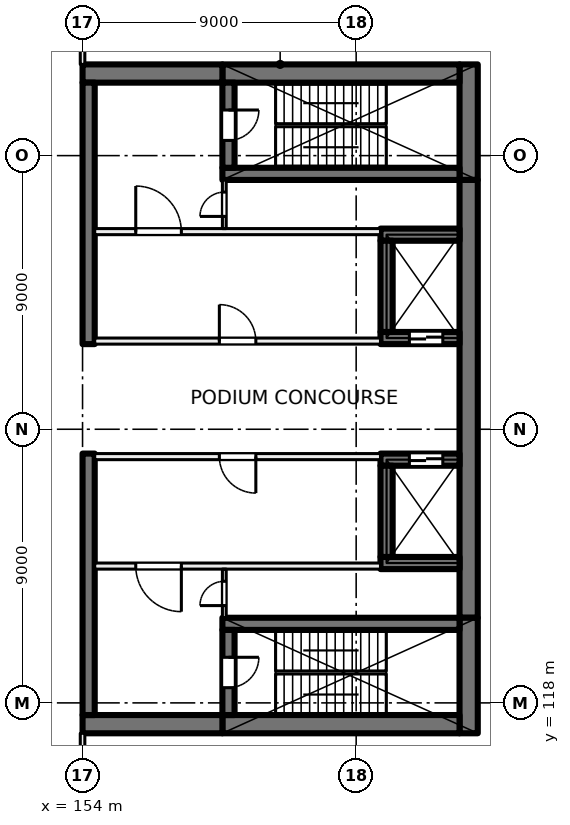
"""IFC4 building model, lengths in metres.
Left out: names, types, materials, properties, quantities, classifications, styles, units other than length and angle.
Written with IfcOpenShell. Run it as: python <this file> out.ifc"""

import sys

from ifc_helpers import new_model, si_unit, direction, frame, frame_2d, origin, place, context, subcontext, project, spatial, rectangle, extrude, element, fill, save


model = new_model("IFC4")
c1 = context("Model", 3, precision=1e-05, world=origin(), true_north=direction((0.0, 1.0)))
c2 = subcontext(c1, "Body", "Model", "MODEL_VIEW")
j1 = project(units=[si_unit("LENGTHUNIT", "METRE"), si_unit("PLANEANGLEUNIT", "RADIAN")], contexts=[c1])
p1 = place(None, origin())
s1 = spatial("IfcSite", under=j1, at=p1, CompositionType="ELEMENT")
p2 = place(p1, origin())
s2 = spatial("IfcBuilding", under=s1, at=p2, CompositionType="ELEMENT")
p3 = place(p2, frame((0.0, 0.0, 22.5)))
s3 = spatial("IfcBuildingStorey", under=s2, at=p3, CompositionType="ELEMENT", Elevation=22.5)
p4 = place(p3, frame((166.7, 139.0, 0.0), z_axis=(0.0, 0.0, 1.0), x_axis=(0.0, -1.0, 0.0)))
e1 = element("IfcWall", 1, at=p4, inside=s3, PredefinedType="SHEAR", context=c2, shape_type="SweptSolid", body=[
    extrude(rectangle(XDim=3.8, YDim=0.6, at=frame_2d((1.9, 0.0))), origin(), (0.0, 0.0, 1.0), 5.0),
])
p5 = place(p3, frame((166.7, 135.2, 0.0), z_axis=(0.0, 0.0, 1.0), x_axis=(0.0, -1.0, 0.0)))
e2 = element("IfcWall", 2, at=p5, inside=s3, PredefinedType="SHEAR", context=c2, shape_type="SweptSolid", body=[
    extrude(rectangle(XDim=14.4, YDim=0.6, at=frame_2d((7.2, 0.0))), origin(), (0.0, 0.0, 1.0), 5.0),
])
p6 = place(p3, frame((166.7, 120.8, 0.0), z_axis=(0.0, 0.0, 1.0), x_axis=(0.0, -1.0, 0.0)))
e3 = element("IfcWall", 3, at=p6, inside=s3, PredefinedType="SHEAR", context=c2, shape_type="SweptSolid", body=[
    extrude(rectangle(XDim=3.8, YDim=0.6, at=frame_2d((1.9, 0.0))), origin(), (0.0, 0.0, 1.0), 5.0),
])
for number, where, z_axis, x_axis in (
    (4, (166.4, 138.7, 0.0), (0.0, 0.0, 1.0), (-1.0, 0.0, 0.0)),
    (5, (166.4, 117.3, 0.0), (0.0, 0.0, 1.0), (-1.0, 0.0, 0.0)),
):
    element("IfcWall", number, at=place(p3, frame(where, z_axis=z_axis, x_axis=x_axis)), inside=s3, PredefinedType="SHEAR", context=c2, shape_type="SweptSolid", body=[
        extrude(rectangle(XDim=7.8, YDim=0.6, at=frame_2d((3.9, 0.0))), origin(), (0.0, 0.0, 1.0), 5.0),
    ])
for number, where, z_axis, x_axis in (
    (6, (158.6, 138.7, 0.0), (0.0, 0.0, 1.0), (-1.0, 0.0, 0.0)),
    (7, (158.6, 117.3, 0.0), (0.0, 0.0, 1.0), (-1.0, 0.0, 0.0)),
):
    element("IfcWall", number, at=place(p3, frame(where, z_axis=z_axis, x_axis=x_axis)), inside=s3, PredefinedType="SHEAR", context=c2, shape_type="SweptSolid", body=[
        extrude(rectangle(XDim=4.6, YDim=0.6, at=frame_2d((2.3, 0.0))), origin(), (0.0, 0.0, 1.0), 5.0),
    ])
p7 = place(p3, frame((166.4, 135.4, 0.0), z_axis=(0.0, 0.0, 1.0), x_axis=(-1.0, 0.0, 0.0)))
e8 = element("IfcWall", 8, at=p7, inside=s3, PredefinedType="SHEAR", context=c2, shape_type="SweptSolid", body=[
    extrude(rectangle(XDim=7.8, YDim=0.4, at=frame_2d((3.9, 0.0))), origin(), (0.0, 0.0, 1.0), 5.0),
])
p8 = place(p3, frame((158.8, 138.4, 0.0), z_axis=(0.0, 0.0, 1.0), x_axis=(0.0, -1.0, 0.0)))
e9 = element("IfcWall", 9, at=p8, inside=s3, PredefinedType="SHEAR", context=c2, shape_type="SweptSolid", body=[
    extrude(rectangle(XDim=2.8, YDim=0.4, at=frame_2d((1.4, 0.0))), origin(), (0.0, 0.0, 1.0), 5.0),
])
p9 = place(p8, frame((0.9, 0.0, 0.0)))
e10 = element("IfcOpeningElement", 10, at=p9, cuts=e9, PredefinedType="OPENING", context=c2, shape_type="SweptSolid", body=[
    extrude(rectangle(XDim=1.0, YDim=2.1, at=frame_2d((0.5, 1.05))), frame((0.0, 0.21, 0.0), z_axis=(0.0, -1.0, 0.0), x_axis=(1.0, 0.0, 0.0)), (0.0, 0.0, 1.0), 0.42),
])
p10 = place(p3, frame((166.4, 120.6, 0.0), z_axis=(0.0, 0.0, 1.0), x_axis=(-1.0, 0.0, 0.0)))
e11 = element("IfcWall", 11, at=p10, inside=s3, PredefinedType="SHEAR", context=c2, shape_type="SweptSolid", body=[
    extrude(rectangle(XDim=7.8, YDim=0.4, at=frame_2d((3.9, 0.0))), origin(), (0.0, 0.0, 1.0), 5.0),
])
p11 = place(p3, frame((158.8, 120.4, 0.0), z_axis=(0.0, 0.0, 1.0), x_axis=(0.0, -1.0, 0.0)))
e12 = element("IfcWall", 12, at=p11, inside=s3, PredefinedType="SHEAR", context=c2, shape_type="SweptSolid", body=[
    extrude(rectangle(XDim=2.8, YDim=0.4, at=frame_2d((1.4, 0.0))), origin(), (0.0, 0.0, 1.0), 5.0),
])
p12 = place(p11, frame((0.9, 0.0, 0.0)))
e13 = element("IfcOpeningElement", 13, at=p12, cuts=e12, PredefinedType="OPENING", context=c2, shape_type="SweptSolid", body=[
    extrude(rectangle(XDim=1.0, YDim=2.1, at=frame_2d((0.5, 1.05))), frame((0.0, 0.21, 0.0), z_axis=(0.0, -1.0, 0.0), x_axis=(1.0, 0.0, 0.0)), (0.0, 0.0, 1.0), 0.42),
])
p13 = place(p3, frame((166.4, 130.0, 0.0), z_axis=(0.0, 0.0, 1.0), x_axis=(-1.0, 0.0, 0.0)))
e14 = element("IfcWall", 14, at=p13, inside=s3, PredefinedType="SHEAR", context=c2, shape_type="SweptSolid", body=[
    extrude(rectangle(XDim=2.6, YDim=0.4, at=frame_2d((1.3, 0.0))), origin(), (0.0, 0.0, 1.0), 5.0),
])
p14 = place(p13, frame((0.55, 0.0, 0.0)))
e15 = element("IfcOpeningElement", 15, at=p14, cuts=e14, PredefinedType="OPENING", context=c2, shape_type="SweptSolid", body=[
    extrude(rectangle(XDim=1.1, YDim=2.1, at=frame_2d((0.55, 1.05))), frame((0.0, 0.21, 0.0), z_axis=(0.0, -1.0, 0.0), x_axis=(1.0, 0.0, 0.0)), (0.0, 0.0, 1.0), 0.42),
])
p15 = place(p3, frame((166.4, 133.4, 0.0), z_axis=(0.0, 0.0, 1.0), x_axis=(-1.0, 0.0, 0.0)))
e16 = element("IfcWall", 16, at=p15, inside=s3, PredefinedType="SHEAR", context=c2, shape_type="SweptSolid", body=[
    extrude(rectangle(XDim=2.6, YDim=0.4, at=frame_2d((1.3, 0.0))), origin(), (0.0, 0.0, 1.0), 5.0),
])
p16 = place(p3, frame((164.0, 133.2, 0.0), z_axis=(0.0, 0.0, 1.0), x_axis=(0.0, -1.0, 0.0)))
e17 = element("IfcWall", 17, at=p16, inside=s3, PredefinedType="SHEAR", context=c2, shape_type="SweptSolid", body=[
    extrude(rectangle(XDim=3.0, YDim=0.4, at=frame_2d((1.5, 0.0))), origin(), (0.0, 0.0, 1.0), 5.0),
])
p17 = place(p3, frame((166.4, 126.0, 0.0), z_axis=(0.0, 0.0, 1.0), x_axis=(-1.0, 0.0, 0.0)))
e18 = element("IfcWall", 18, at=p17, inside=s3, PredefinedType="SHEAR", context=c2, shape_type="SweptSolid", body=[
    extrude(rectangle(XDim=2.6, YDim=0.4, at=frame_2d((1.3, 0.0))), origin(), (0.0, 0.0, 1.0), 5.0),
])
p18 = place(p17, frame((0.55, 0.0, 0.0)))
e19 = element("IfcOpeningElement", 19, at=p18, cuts=e18, PredefinedType="OPENING", context=c2, shape_type="SweptSolid", body=[
    extrude(rectangle(XDim=1.1, YDim=2.1, at=frame_2d((0.55, 1.05))), frame((0.0, 0.21, 0.0), z_axis=(0.0, -1.0, 0.0), x_axis=(1.0, 0.0, 0.0)), (0.0, 0.0, 1.0), 0.42),
])
p19 = place(p3, frame((166.4, 122.6, 0.0), z_axis=(0.0, 0.0, 1.0), x_axis=(-1.0, 0.0, 0.0)))
e20 = element("IfcWall", 20, at=p19, inside=s3, PredefinedType="SHEAR", context=c2, shape_type="SweptSolid", body=[
    extrude(rectangle(XDim=2.6, YDim=0.4, at=frame_2d((1.3, 0.0))), origin(), (0.0, 0.0, 1.0), 5.0),
])
p20 = place(p3, frame((164.0, 125.8, 0.0), z_axis=(0.0, 0.0, 1.0), x_axis=(0.0, -1.0, 0.0)))
e21 = element("IfcWall", 21, at=p20, inside=s3, PredefinedType="SHEAR", context=c2, shape_type="SweptSolid", body=[
    extrude(rectangle(XDim=3.0, YDim=0.4, at=frame_2d((1.5, 0.0))), origin(), (0.0, 0.0, 1.0), 5.0),
])
for number, where, z_axis, x_axis in (
    (22, (154.2, 138.4, 0.0), (0.0, 0.0, 1.0), (0.0, -1.0, 0.0)),
    (23, (154.2, 126.2, 0.0), (0.0, 0.0, 1.0), (0.0, -1.0, 0.0)),
):
    element("IfcWall", number, at=place(p3, frame(where, z_axis=z_axis, x_axis=x_axis)), inside=s3, PredefinedType="SHEAR", context=c2, shape_type="SweptSolid", body=[
        extrude(rectangle(XDim=8.6, YDim=0.4, at=frame_2d((4.3, 0.0))), origin(), (0.0, 0.0, 1.0), 5.0),
    ])
p21 = place(p3, frame((163.8, 126.1, 0.0), z_axis=(0.0, 0.0, 1.0), x_axis=(-1.0, 0.0, 0.0)))
e24 = element("IfcWall", 24, at=p21, inside=s3, PredefinedType="PARTITIONING", context=c2, shape_type="SweptSolid", body=[
    extrude(rectangle(XDim=9.4, YDim=0.2, at=frame_2d((4.7, 0.0))), origin(), (0.0, 0.0, 1.0), 4.625),
])
p22 = place(p21, frame((4.1, 0.0, 0.0)))
e25 = element("IfcOpeningElement", 25, at=p22, cuts=e24, PredefinedType="OPENING", context=c2, shape_type="SweptSolid", body=[
    extrude(rectangle(XDim=1.2, YDim=2.1, at=frame_2d((0.6, 1.05))), frame((0.0, 0.11, 0.0), z_axis=(0.0, -1.0, 0.0), x_axis=(1.0, 0.0, 0.0)), (0.0, 0.0, 1.0), 0.22),
])
p23 = place(p3, frame((163.8, 122.5, 0.0), z_axis=(0.0, 0.0, 1.0), x_axis=(-1.0, 0.0, 0.0)))
e26 = element("IfcWall", 26, at=p23, inside=s3, PredefinedType="PARTITIONING", context=c2, shape_type="SweptSolid", body=[
    extrude(rectangle(XDim=9.4, YDim=0.2, at=frame_2d((4.7, 0.0))), origin(), (0.0, 0.0, 1.0), 4.625),
])
p24 = place(p23, frame((6.55, 0.0, 0.0)))
e27 = element("IfcOpeningElement", 27, at=p24, cuts=e26, PredefinedType="OPENING", context=c2, shape_type="SweptSolid", body=[
    extrude(rectangle(XDim=1.5, YDim=2.1, at=frame_2d((0.75, 1.05))), frame((0.0, 0.11, 0.0), z_axis=(0.0, -1.0, 0.0), x_axis=(1.0, 0.0, 0.0)), (0.0, 0.0, 1.0), 0.22),
])
p25 = place(p3, frame((158.663, 120.8, 0.0), z_axis=(0.0, 0.0, 1.0), x_axis=(0.0, 1.0, 0.0)))
e28 = element("IfcWall", 28, at=p25, inside=s3, PredefinedType="PARTITIONING", context=c2, shape_type="SweptSolid", body=[
    extrude(rectangle(XDim=1.6, YDim=0.125, at=frame_2d((0.8, 0.0))), origin(), (0.0, 0.0, 1.0), 4.625),
])
p26 = place(p25, frame((0.4, 0.0, 0.0)))
e29 = element("IfcOpeningElement", 29, at=p26, cuts=e28, PredefinedType="OPENING", context=c2, shape_type="SweptSolid", body=[
    extrude(rectangle(XDim=0.8, YDim=2.1, at=frame_2d((0.4, 1.05))), frame((0.0, 0.073, 0.0), z_axis=(0.0, -1.0, 0.0), x_axis=(1.0, 0.0, 0.0)), (0.0, 0.0, 1.0), 0.145),
])
p27 = place(p3, frame((154.4, 129.9, 0.0), z_axis=(0.0, 0.0, 1.0), x_axis=(1.0, 0.0, 0.0)))
e30 = element("IfcWall", 30, at=p27, inside=s3, PredefinedType="PARTITIONING", context=c2, shape_type="SweptSolid", body=[
    extrude(rectangle(XDim=9.4, YDim=0.2, at=frame_2d((4.7, 0.0))), origin(), (0.0, 0.0, 1.0), 4.625),
])
p28 = place(p27, frame((4.1, 0.0, 0.0)))
e31 = element("IfcOpeningElement", 31, at=p28, cuts=e30, PredefinedType="OPENING", context=c2, shape_type="SweptSolid", body=[
    extrude(rectangle(XDim=1.2, YDim=2.1, at=frame_2d((0.6, 1.05))), frame((0.0, 0.11, 0.0), z_axis=(0.0, -1.0, 0.0), x_axis=(1.0, 0.0, 0.0)), (0.0, 0.0, 1.0), 0.22),
])
p29 = place(p3, frame((154.4, 133.5, 0.0), z_axis=(0.0, 0.0, 1.0), x_axis=(1.0, 0.0, 0.0)))
e32 = element("IfcWall", 32, at=p29, inside=s3, PredefinedType="PARTITIONING", context=c2, shape_type="SweptSolid", body=[
    extrude(rectangle(XDim=9.4, YDim=0.2, at=frame_2d((4.7, 0.0))), origin(), (0.0, 0.0, 1.0), 4.625),
])
p30 = place(p29, frame((1.35, 0.0, 0.0)))
e33 = element("IfcOpeningElement", 33, at=p30, cuts=e32, PredefinedType="OPENING", context=c2, shape_type="SweptSolid", body=[
    extrude(rectangle(XDim=1.5, YDim=2.1, at=frame_2d((0.75, 1.05))), frame((0.0, 0.11, 0.0), z_axis=(0.0, -1.0, 0.0), x_axis=(1.0, 0.0, 0.0)), (0.0, 0.0, 1.0), 0.22),
])
p31 = place(p3, frame((158.663, 133.6, 0.0), z_axis=(0.0, 0.0, 1.0), x_axis=(0.0, 1.0, 0.0)))
e34 = element("IfcWall", 34, at=p31, inside=s3, PredefinedType="PARTITIONING", context=c2, shape_type="SweptSolid", body=[
    extrude(rectangle(XDim=1.6, YDim=0.125, at=frame_2d((0.8, 0.0))), origin(), (0.0, 0.0, 1.0), 4.625),
])
p32 = place(p31, frame((0.4, 0.0, 0.0)))
e35 = element("IfcOpeningElement", 35, at=p32, cuts=e34, PredefinedType="OPENING", context=c2, shape_type="SweptSolid", body=[
    extrude(rectangle(XDim=0.8, YDim=2.1, at=frame_2d((0.4, 1.05))), frame((0.0, 0.073, 0.0), z_axis=(0.0, -1.0, 0.0), x_axis=(1.0, 0.0, 0.0)), (0.0, 0.0, 1.0), 0.145),
])
p33 = place(p3, frame((154.0, 103.075, 0.0), z_axis=(0.0, 0.0, 1.0), x_axis=(0.0, 1.0, 0.0)))
e36 = element("IfcWall", 36, at=p33, inside=s3, PredefinedType="PARTITIONING", context=c2, shape_type="SweptSolid", body=[
    extrude(rectangle(XDim=13.925, YDim=0.15, at=frame_2d((6.962, 0.0))), origin(), (0.0, 0.0, 1.0), 4.625),
])
p34 = place(p3, frame((154.0, 153.4, 0.0), z_axis=(0.0, 0.0, 1.0), x_axis=(0.0, -1.0, 0.0)))
e37 = element("IfcWall", 37, at=p34, inside=s3, PredefinedType="PARTITIONING", context=c2, shape_type="SweptSolid", body=[
    extrude(rectangle(XDim=14.4, YDim=0.15, at=frame_2d((7.2, 0.0))), origin(), (0.0, 0.0, 1.0), 4.625),
])
p35 = place(p34, frame((11.0, 0.0, 0.0)))
e38 = element("IfcOpeningElement", 38, at=p35, cuts=e37, PredefinedType="OPENING", context=c2, shape_type="SweptSolid", body=[
    extrude(rectangle(XDim=1.8, YDim=2.1, at=frame_2d((0.9, 1.05))), frame((0.0, 0.085, 0.0), z_axis=(0.0, -1.0, 0.0), x_axis=(1.0, 0.0, 0.0)), (0.0, 0.0, 1.0), 0.17),
])
p36 = place(p18, origin())
e39 = element("IfcDoor", 39, at=p36, inside=s3, OperationType="DOUBLE_DOOR_SLIDING", PredefinedType="DOOR", context=c2, shape_type="SweptSolid", body=[
    extrude(rectangle(XDim=1.1, YDim=2.1, at=frame_2d((0.55, 1.05))), frame((0.0, 0.025, 0.0), z_axis=(0.0, -1.0, 0.0), x_axis=(1.0, 0.0, 0.0)), (0.0, 0.0, 1.0), 0.05),
])
fill(e19, e39)
p37 = place(p14, origin())
e40 = element("IfcDoor", 40, at=p37, inside=s3, OperationType="DOUBLE_DOOR_SLIDING", PredefinedType="DOOR", context=c2, shape_type="SweptSolid", body=[
    extrude(rectangle(XDim=1.1, YDim=2.1, at=frame_2d((0.55, 1.05))), frame((0.0, 0.025, 0.0), z_axis=(0.0, -1.0, 0.0), x_axis=(1.0, 0.0, 0.0)), (0.0, 0.0, 1.0), 0.05),
])
fill(e15, e40)
p38 = place(p22, origin())
e41 = element("IfcDoor", 41, at=p38, inside=s3, OperationType="DOUBLE_DOOR_SINGLE_SWING", PredefinedType="DOOR", context=c2, shape_type="SweptSolid", body=[
    extrude(rectangle(XDim=1.2, YDim=2.1, at=frame_2d((0.6, 1.05))), frame((0.0, 0.025, 0.0), z_axis=(0.0, -1.0, 0.0), x_axis=(1.0, 0.0, 0.0)), (0.0, 0.0, 1.0), 0.05),
])
fill(e25, e41)
p39 = place(p24, origin())
e42 = element("IfcDoor", 42, at=p39, inside=s3, OperationType="DOUBLE_DOOR_SINGLE_SWING", PredefinedType="DOOR", context=c2, shape_type="SweptSolid", body=[
    extrude(rectangle(XDim=1.5, YDim=2.1, at=frame_2d((0.75, 1.05))), frame((0.0, 0.025, 0.0), z_axis=(0.0, -1.0, 0.0), x_axis=(1.0, 0.0, 0.0)), (0.0, 0.0, 1.0), 0.05),
])
fill(e27, e42)
p40 = place(p12, origin())
e43 = element("IfcDoor", 43, at=p40, inside=s3, OperationType="SINGLE_SWING_LEFT", PredefinedType="DOOR", context=c2, shape_type="SweptSolid", body=[
    extrude(rectangle(XDim=1.0, YDim=2.1, at=frame_2d((0.5, 1.05))), frame((0.0, 0.025, 0.0), z_axis=(0.0, -1.0, 0.0), x_axis=(1.0, 0.0, 0.0)), (0.0, 0.0, 1.0), 0.05),
])
fill(e13, e43)
p41 = place(p26, origin())
e44 = element("IfcDoor", 44, at=p41, inside=s3, OperationType="SINGLE_SWING_RIGHT", PredefinedType="DOOR", context=c2, shape_type="SweptSolid", body=[
    extrude(rectangle(XDim=0.8, YDim=2.1, at=frame_2d((0.4, 1.05))), frame((0.0, 0.025, 0.0), z_axis=(0.0, -1.0, 0.0), x_axis=(1.0, 0.0, 0.0)), (0.0, 0.0, 1.0), 0.05),
])
fill(e29, e44)
p42 = place(p28, origin())
e45 = element("IfcDoor", 45, at=p42, inside=s3, OperationType="DOUBLE_DOOR_SINGLE_SWING", PredefinedType="DOOR", context=c2, shape_type="SweptSolid", body=[
    extrude(rectangle(XDim=1.2, YDim=2.1, at=frame_2d((0.6, 1.05))), frame((0.0, 0.025, 0.0), z_axis=(0.0, -1.0, 0.0), x_axis=(1.0, 0.0, 0.0)), (0.0, 0.0, 1.0), 0.05),
])
fill(e31, e45)
p43 = place(p30, origin())
e46 = element("IfcDoor", 46, at=p43, inside=s3, OperationType="DOUBLE_DOOR_SINGLE_SWING", PredefinedType="DOOR", context=c2, shape_type="SweptSolid", body=[
    extrude(rectangle(XDim=1.5, YDim=2.1, at=frame_2d((0.75, 1.05))), frame((0.0, 0.025, 0.0), z_axis=(0.0, -1.0, 0.0), x_axis=(1.0, 0.0, 0.0)), (0.0, 0.0, 1.0), 0.05),
])
fill(e33, e46)
p44 = place(p9, origin())
e47 = element("IfcDoor", 47, at=p44, inside=s3, OperationType="SINGLE_SWING_RIGHT", PredefinedType="DOOR", context=c2, shape_type="SweptSolid", body=[
    extrude(rectangle(XDim=1.0, YDim=2.1, at=frame_2d((0.5, 1.05))), frame((0.0, 0.025, 0.0), z_axis=(0.0, -1.0, 0.0), x_axis=(1.0, 0.0, 0.0)), (0.0, 0.0, 1.0), 0.05),
])
fill(e10, e47)
p45 = place(p32, origin())
e48 = element("IfcDoor", 48, at=p45, inside=s3, OperationType="SINGLE_SWING_LEFT", PredefinedType="DOOR", context=c2, shape_type="SweptSolid", body=[
    extrude(rectangle(XDim=0.8, YDim=2.1, at=frame_2d((0.4, 1.05))), frame((0.0, 0.025, 0.0), z_axis=(0.0, -1.0, 0.0), x_axis=(1.0, 0.0, 0.0)), (0.0, 0.0, 1.0), 0.05),
])
fill(e35, e48)
save(model, sys.argv[1])
